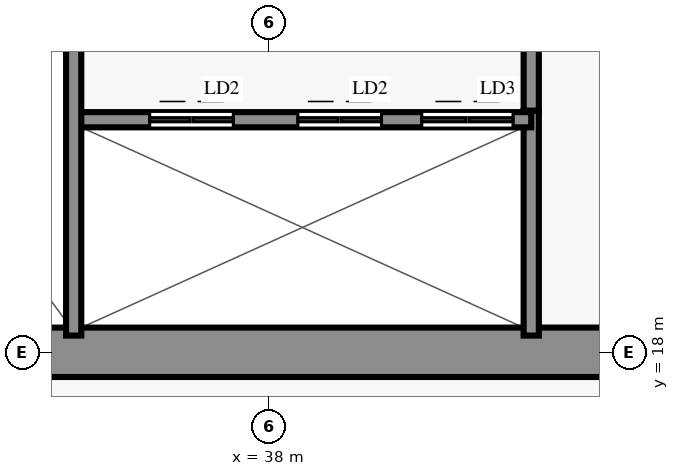
"""IFC4 building model, lengths in metres.
Left out: names, types, materials, properties, quantities, classifications, styles, units other than length and angle.
Written with IfcOpenShell. Run it as: python <this file> out.ifc"""

import sys

from ifc_helpers import new_model, si_unit, direction, frame, frame_2d, origin, place, context, subcontext, project, spatial, rectangle, extrude, source, transform, mapped, element, fill, save


model = new_model("IFC4")
c1 = context("Model", 3, precision=1e-05, world=origin(), true_north=direction((0.0, 1.0)))
c2 = subcontext(c1, "Body", "Model", "MODEL_VIEW")
j1 = project(units=[si_unit("LENGTHUNIT", "METRE"), si_unit("PLANEANGLEUNIT", "RADIAN")], contexts=[c1])
p1 = place(None, origin())
s1 = spatial("IfcSite", under=j1, at=p1, CompositionType="ELEMENT")
p2 = place(p1, origin())
s2 = spatial("IfcBuilding", under=s1, at=p2, CompositionType="ELEMENT")
p3 = place(p2, frame((0.0, 0.0, 70.4)))
s3 = spatial("IfcBuildingStorey", under=s2, at=p3, CompositionType="ELEMENT", Elevation=70.4)
p4 = place(p3, frame((31.825, 18.0, 0.0), z_axis=(0.0, 0.0, 1.0), x_axis=(1.0, 0.0, 0.0)))
e1 = element("IfcWall", 1, at=p4, inside=s3, PredefinedType="SHEAR", context=c2, shape_type="SweptSolid", body=[
    extrude(rectangle(XDim=12.35, YDim=0.65, at=frame_2d((6.175, 0.0))), origin(), (0.0, 0.0, 1.0), 3.95),
])
p5 = place(p3, frame((41.45, 18.22, 0.0), z_axis=(0.0, 0.0, 1.0), x_axis=(0.0, 1.0, 0.0)))
e2 = element("IfcWall", 2, at=p5, inside=s3, PredefinedType="PARTITIONING", context=c2, shape_type="SweptSolid", body=[
    extrude(rectangle(XDim=2.96, YDim=0.2, at=frame_2d((1.48, 0.0))), origin(), (0.0, 0.0, 1.0), 3.61),
])
p6 = place(p3, frame((41.45, 21.18, 0.0), z_axis=(0.0, 0.0, 1.0), x_axis=(0.0, 1.0, 0.0)))
e3 = element("IfcWall", 3, at=p6, inside=s3, PredefinedType="PARTITIONING", context=c2, shape_type="SweptSolid", body=[
    extrude(rectangle(XDim=7.42, YDim=0.2, at=frame_2d((3.71, 0.0))), origin(), (0.0, 0.0, 1.0), 3.61),
])
p7 = place(p6, frame((2.6, 0.0, 0.0)))
e4 = element("IfcOpeningElement", 4, at=p7, cuts=e3, PredefinedType="OPENING", context=c2, shape_type="SweptSolid", body=[
    extrude(rectangle(XDim=0.9, YDim=2.1, at=frame_2d((0.45, 1.05))), frame((0.0, 0.112, 0.0), z_axis=(0.0, -1.0, 0.0), x_axis=(1.0, 0.0, 0.0)), (0.0, 0.0, 1.0), 0.224),
])
p8 = place(p3, frame((35.43, 21.06, 0.0), z_axis=(0.0, 0.0, 1.0), x_axis=(1.0, 0.0, 0.0)))
e5 = element("IfcWall", 5, at=p8, inside=s3, PredefinedType="PARTITIONING", context=c2, shape_type="SweptSolid", body=[
    extrude(rectangle(XDim=6.02, YDim=0.2, at=frame_2d((3.01, 0.0))), origin(), (0.0, 0.0, 1.0), 3.61),
])
p9 = place(p8, frame((1.0, 0.0, 0.0)))
e6 = element("IfcOpeningElement", 6, at=p9, cuts=e5, PredefinedType="OPENING", context=c2, shape_type="SweptSolid", body=[
    extrude(rectangle(XDim=1.1, YDim=2.15, at=frame_2d((0.55, 1.075))), frame((0.0, 0.112, 0.0), z_axis=(0.0, -1.0, 0.0), x_axis=(1.0, 0.0, 0.0)), (0.0, 0.0, 1.0), 0.224),
])
p10 = place(p8, frame((2.95, 0.0, 0.0)))
e7 = element("IfcOpeningElement", 7, at=p10, cuts=e5, PredefinedType="OPENING", context=c2, shape_type="SweptSolid", body=[
    extrude(rectangle(XDim=1.1, YDim=2.15, at=frame_2d((0.55, 1.075))), frame((0.0, 0.112, 0.0), z_axis=(0.0, -1.0, 0.0), x_axis=(1.0, 0.0, 0.0)), (0.0, 0.0, 1.0), 0.224),
])
p11 = place(p8, frame((4.58, 0.0, 0.0)))
e8 = element("IfcOpeningElement", 8, at=p11, cuts=e5, PredefinedType="OPENING", context=c2, shape_type="SweptSolid", body=[
    extrude(rectangle(XDim=1.2, YDim=2.15, at=frame_2d((0.6, 1.075))), frame((0.0, 0.112, 0.0), z_axis=(0.0, -1.0, 0.0), x_axis=(1.0, 0.0, 0.0)), (0.0, 0.0, 1.0), 0.224),
])
p12 = place(p3, frame((35.43, 18.22, 0.0), z_axis=(0.0, 0.0, 1.0), x_axis=(0.0, 1.0, 0.0)))
e9 = element("IfcWall", 9, at=p12, inside=s3, PredefinedType="SOLIDWALL", context=c2, shape_type="SweptSolid", body=[
    extrude(rectangle(XDim=7.22, YDim=0.2, at=frame_2d((3.61, 0.0))), origin(), (0.0, 0.0, 1.0), 3.69),
])
p13 = place(p12, frame((6.68, 0.0, 0.0), z_axis=(0.0, 0.0, 1.0), x_axis=(-1.0, 0.0, 0.0)))
e10 = element("IfcOpeningElement", 10, at=p13, cuts=e9, PredefinedType="OPENING", context=c2, shape_type="SweptSolid", body=[
    extrude(rectangle(XDim=1.1, YDim=2.15, at=frame_2d((0.55, 1.075))), frame((0.0, 0.112, 0.0), z_axis=(0.0, -1.0, 0.0), x_axis=(1.0, 0.0, 0.0)), (0.0, 0.0, 1.0), 0.224),
])
m1 = source(origin(), c2, "Body", "SweptSolid", [
    extrude(rectangle(XDim=1.1, YDim=2.15, at=frame_2d((0.55, 1.075))), frame((0.0, 0.025, 0.0), z_axis=(0.0, -1.0, 0.0), x_axis=(1.0, 0.0, 0.0)), (0.0, 0.0, 1.0), 0.05),
])
p14 = place(p9, origin())
e11 = element("IfcDoor", 11, at=p14, inside=s3, OperationType="DOUBLE_DOOR_SLIDING", PredefinedType="DOOR", context=c2, shape_type="MappedRepresentation", body=[
    mapped(m1, transform((0.0, 0.0, 0.0), scale=1.0)),
])
fill(e6, e11)
p15 = place(p10, origin())
e12 = element("IfcDoor", 12, at=p15, inside=s3, OperationType="DOUBLE_DOOR_SLIDING", PredefinedType="DOOR", context=c2, shape_type="MappedRepresentation", body=[
    mapped(m1, transform((0.0, 0.0, 0.0), scale=1.0)),
])
fill(e7, e12)
m2 = source(origin(), c2, "Body", "SweptSolid", [
    extrude(rectangle(XDim=1.2, YDim=2.15, at=frame_2d((0.6, 1.075))), frame((0.0, 0.025, 0.0), z_axis=(0.0, -1.0, 0.0), x_axis=(1.0, 0.0, 0.0)), (0.0, 0.0, 1.0), 0.05),
])
p16 = place(p11, origin())
e13 = element("IfcDoor", 13, at=p16, inside=s3, OperationType="DOUBLE_DOOR_SLIDING", PredefinedType="DOOR", context=c2, shape_type="MappedRepresentation", body=[
    mapped(m2, transform((0.0, 0.0, 0.0), scale=1.0)),
])
fill(e8, e13)
save(model, sys.argv[1])
